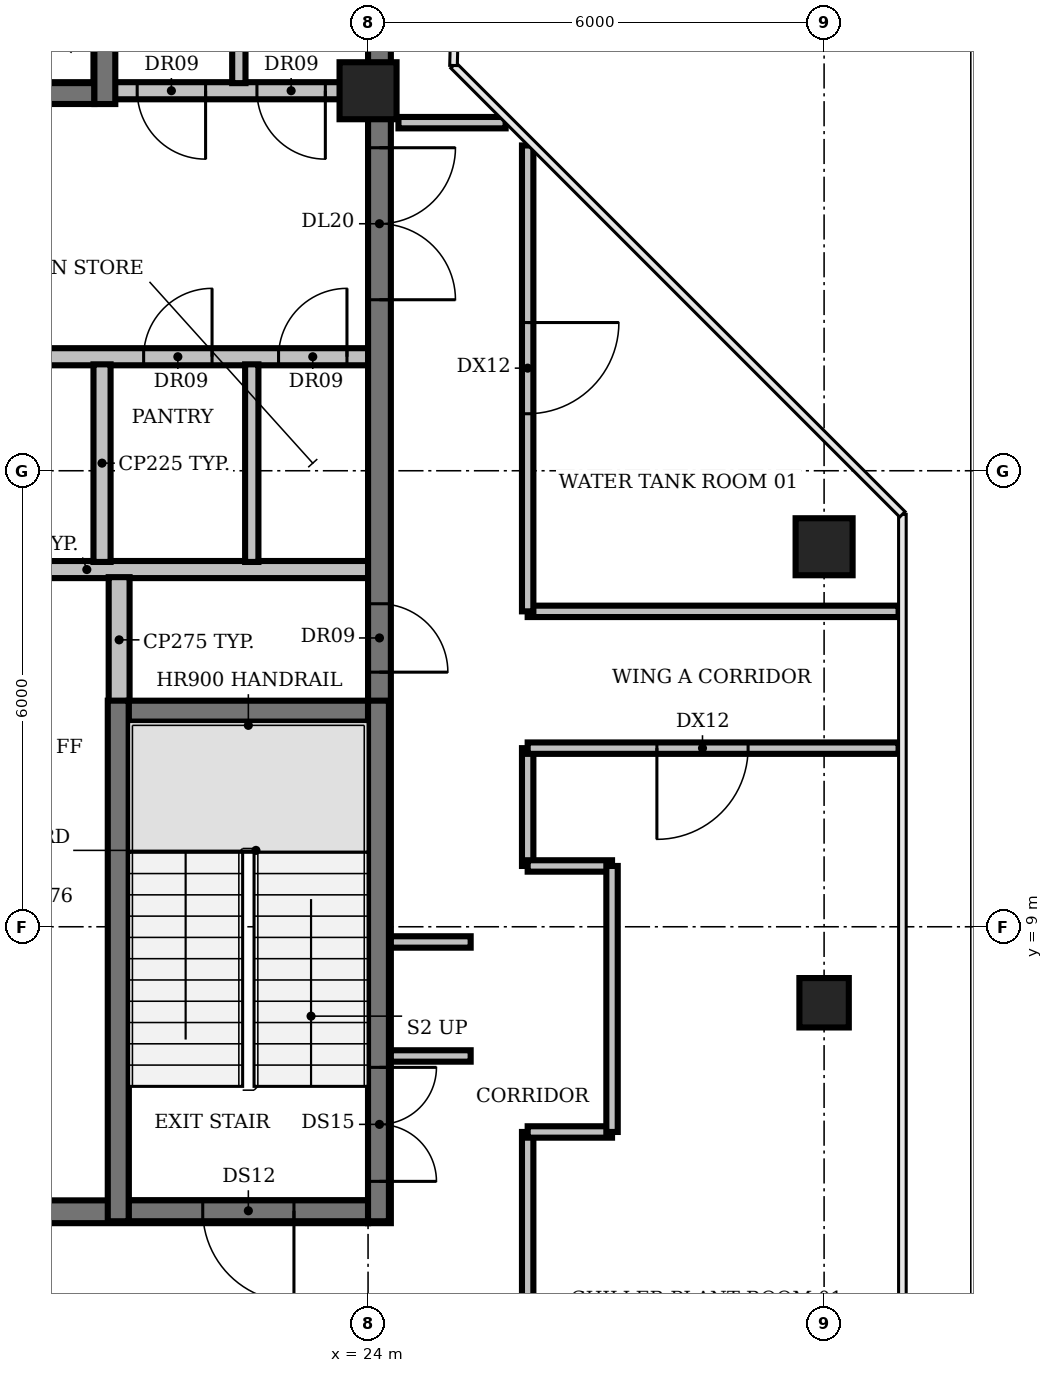
"""IFC4 building model, lengths in metres.
Left out: names, types, materials, properties, quantities, classifications, styles, units other than length and angle.
Written with IfcOpenShell. Run it as: python <this file> out.ifc"""

import sys

from ifc_helpers import new_model, si_unit, direction, frame, frame_2d, origin, origin_2d, place, context, subcontext, project, spatial, rectangle, circle, extrude, element, fill, save


model = new_model("IFC4")
c1 = context("Model", 3, precision=1e-05, world=origin(), true_north=direction((0.0, 1.0)))
c2 = subcontext(c1, "Body", "Model", "MODEL_VIEW")
j1 = project(units=[si_unit("LENGTHUNIT", "METRE"), si_unit("PLANEANGLEUNIT", "RADIAN")], contexts=[c1])
p1 = place(None, origin())
s1 = spatial("IfcSite", under=j1, at=p1, CompositionType="ELEMENT")
p2 = place(p1, origin())
s2 = spatial("IfcBuilding", under=s1, at=p2, CompositionType="ELEMENT")
p3 = place(p2, frame((0.0, 0.0, 339.8)))
s3 = spatial("IfcBuildingStorey", under=s2, at=p3, CompositionType="ELEMENT", Elevation=339.8)
p4 = place(p3, frame((24.0, 20.0, 0.0), z_axis=(0.0, 0.0, 1.0), x_axis=(1.0, 0.0, 0.0)))
e1 = element("IfcColumn", 1, at=p4, inside=s3, PredefinedType="COLUMN", context=c2, shape_type="SweptSolid", body=[
    extrude(circle(Radius=0.375, at=origin_2d()), origin(), (0.0, 0.0, 1.0), 3.9),
])
p5 = place(p3, frame((30.0, 8.0, 0.0), z_axis=(0.0, 0.0, 1.0), x_axis=(1.0, 0.0, 0.0)))
e2 = element("IfcColumn", 2, at=p5, inside=s3, PredefinedType="COLUMN", context=c2, shape_type="SweptSolid", body=[
    extrude(rectangle(XDim=0.65, YDim=0.65, at=origin_2d()), origin(), (0.0, 0.0, 1.0), 3.9),
])
p6 = place(p3, frame((30.0, 14.0, 0.0), z_axis=(0.0, 0.0, 1.0), x_axis=(1.0, 0.0, 0.0)))
e3 = element("IfcColumn", 3, at=p6, inside=s3, PredefinedType="COLUMN", context=c2, shape_type="SweptSolid", body=[
    extrude(circle(Radius=0.375, at=origin_2d()), origin(), (0.0, 0.0, 1.0), 3.9),
])
p7 = place(p3, frame((20.85, 11.825, 0.0), z_axis=(0.0, 0.0, 1.0), x_axis=(1.0, 0.0, 0.0)))
e4 = element("IfcWall", 4, at=p7, inside=s3, PredefinedType="SHEAR", context=c2, shape_type="SweptSolid", body=[
    extrude(rectangle(XDim=3.15, YDim=0.25, at=frame_2d((1.575, 0.0))), origin(), (0.0, 0.0, 1.0), 3.9),
])
p8 = place(p3, frame((16.6, 13.7, 0.0), z_axis=(0.0, 0.0, 1.0), x_axis=(1.0, 0.0, 0.0)))
e5 = element("IfcWall", 5, at=p8, inside=s3, PredefinedType="PARTITIONING", context=c2, shape_type="SweptSolid", body=[
    extrude(rectangle(XDim=7.4, YDim=0.225, at=frame_2d((3.7, 0.0))), origin(), (0.0, 0.0, 1.0), 3.9),
])
p9 = place(p3, frame((9.4, 16.5, 0.0), z_axis=(0.0, 0.0, 1.0), x_axis=(1.0, 0.0, 0.0)))
e6 = element("IfcWall", 6, at=p9, inside=s3, PredefinedType="PARTITIONING", context=c2, shape_type="SweptSolid", body=[
    extrude(rectangle(XDim=14.6, YDim=0.225, at=frame_2d((7.3, 0.0))), origin(), (0.0, 0.0, 1.0), 3.9),
])
p10 = place(p9, frame((0.85, 0.0, 0.0)))
e7 = element("IfcOpeningElement", 7, at=p10, cuts=e6, PredefinedType="OPENING", context=c2, shape_type="SweptSolid", body=[
    extrude(rectangle(XDim=0.9, YDim=2.1, at=frame_2d((0.45, 1.05))), frame((0.0, 0.123, 0.0), z_axis=(0.0, -1.0, 0.0), x_axis=(1.0, 0.0, 0.0)), (0.0, 0.0, 1.0), 0.245),
])
p11 = place(p9, frame((3.625, 0.0, 0.0)))
e8 = element("IfcOpeningElement", 8, at=p11, cuts=e6, PredefinedType="OPENING", context=c2, shape_type="SweptSolid", body=[
    extrude(rectangle(XDim=0.9, YDim=2.1, at=frame_2d((0.45, 1.05))), frame((0.0, 0.123, 0.0), z_axis=(0.0, -1.0, 0.0), x_axis=(1.0, 0.0, 0.0)), (0.0, 0.0, 1.0), 0.245),
])
p12 = place(p9, frame((7.775, 0.0, 0.0)))
e9 = element("IfcOpeningElement", 9, at=p12, cuts=e6, PredefinedType="OPENING", context=c2, shape_type="SweptSolid", body=[
    extrude(rectangle(XDim=1.0, YDim=2.1, at=frame_2d((0.5, 1.05))), frame((0.0, 0.123, 0.0), z_axis=(0.0, -1.0, 0.0), x_axis=(1.0, 0.0, 0.0)), (0.0, 0.0, 1.0), 0.245),
])
p13 = place(p9, frame((11.647, 0.0, 0.0)))
e10 = element("IfcOpeningElement", 10, at=p13, cuts=e6, PredefinedType="OPENING", context=c2, shape_type="SweptSolid", body=[
    extrude(rectangle(XDim=0.9, YDim=2.1, at=frame_2d((0.45, 1.05))), frame((0.0, 0.123, 0.0), z_axis=(0.0, -1.0, 0.0), x_axis=(1.0, 0.0, 0.0)), (0.0, 0.0, 1.0), 0.245),
])
p14 = place(p9, frame((13.423, 0.0, 0.0)))
e11 = element("IfcOpeningElement", 11, at=p14, cuts=e6, PredefinedType="OPENING", context=c2, shape_type="SweptSolid", body=[
    extrude(rectangle(XDim=0.9, YDim=2.1, at=frame_2d((0.45, 1.05))), frame((0.0, 0.123, 0.0), z_axis=(0.0, -1.0, 0.0), x_axis=(1.0, 0.0, 0.0)), (0.0, 0.0, 1.0), 0.245),
])
p15 = place(p3, frame((24.0, 20.0, 0.0), z_axis=(0.0, 0.0, 1.0), x_axis=(-1.0, 0.0, 0.0)))
e12 = element("IfcWall", 12, at=p15, inside=s3, PredefinedType="PARTITIONING", context=c2, shape_type="SweptSolid", body=[
    extrude(rectangle(XDim=14.6, YDim=0.225, at=frame_2d((7.3, 0.0))), origin(), (0.0, 0.0, 1.0), 3.9),
])
p16 = place(p15, frame((12.75, 0.0, 0.0)))
e13 = element("IfcOpeningElement", 13, at=p16, cuts=e12, PredefinedType="OPENING", context=c2, shape_type="SweptSolid", body=[
    extrude(rectangle(XDim=1.1, YDim=2.1, at=frame_2d((0.55, 1.05))), frame((0.0, 0.123, 0.0), z_axis=(0.0, -1.0, 0.0), x_axis=(1.0, 0.0, 0.0)), (0.0, 0.0, 1.0), 0.245),
])
p17 = place(p15, frame((9.95, 0.0, 0.0)))
e14 = element("IfcOpeningElement", 14, at=p17, cuts=e12, PredefinedType="OPENING", context=c2, shape_type="SweptSolid", body=[
    extrude(rectangle(XDim=1.1, YDim=2.1, at=frame_2d((0.55, 1.05))), frame((0.0, 0.123, 0.0), z_axis=(0.0, -1.0, 0.0), x_axis=(1.0, 0.0, 0.0)), (0.0, 0.0, 1.0), 0.245),
])
p18 = place(p15, frame((7.15, 0.0, 0.0)))
e15 = element("IfcOpeningElement", 15, at=p18, cuts=e12, PredefinedType="OPENING", context=c2, shape_type="SweptSolid", body=[
    extrude(rectangle(XDim=1.1, YDim=2.1, at=frame_2d((0.55, 1.05))), frame((0.0, 0.123, 0.0), z_axis=(0.0, -1.0, 0.0), x_axis=(1.0, 0.0, 0.0)), (0.0, 0.0, 1.0), 0.245),
])
p19 = place(p15, frame((4.35, 0.0, 0.0)))
e16 = element("IfcOpeningElement", 16, at=p19, cuts=e12, PredefinedType="OPENING", context=c2, shape_type="SweptSolid", body=[
    extrude(rectangle(XDim=1.1, YDim=2.1, at=frame_2d((0.55, 1.05))), frame((0.0, 0.123, 0.0), z_axis=(0.0, -1.0, 0.0), x_axis=(1.0, 0.0, 0.0)), (0.0, 0.0, 1.0), 0.245),
])
p20 = place(p15, frame((2.137, 0.0, 0.0)))
e17 = element("IfcOpeningElement", 17, at=p20, cuts=e12, PredefinedType="OPENING", context=c2, shape_type="SweptSolid", body=[
    extrude(rectangle(XDim=0.9, YDim=2.1, at=frame_2d((0.45, 1.05))), frame((0.0, 0.123, 0.0), z_axis=(0.0, -1.0, 0.0), x_axis=(1.0, 0.0, 0.0)), (0.0, 0.0, 1.0), 0.245),
])
p21 = place(p15, frame((0.562, 0.0, 0.0)))
e18 = element("IfcOpeningElement", 18, at=p21, cuts=e12, PredefinedType="OPENING", context=c2, shape_type="SweptSolid", body=[
    extrude(rectangle(XDim=0.9, YDim=2.1, at=frame_2d((0.45, 1.05))), frame((0.0, 0.123, 0.0), z_axis=(0.0, -1.0, 0.0), x_axis=(1.0, 0.0, 0.0)), (0.0, 0.0, 1.0), 0.245),
])
for number, where, z_axis, x_axis in (
    (19, (20.5, 13.8, 0.0), (0.0, 0.0, 1.0), (0.0, 1.0, 0.0)),
    (20, (20.5, 20.1, 0.0), (0.0, 0.0, 1.0), (0.0, 1.0, 0.0)),
):
    element("IfcWall", number, at=place(p3, frame(where, z_axis=z_axis, x_axis=x_axis)), inside=s3, PredefinedType="PARTITIONING", context=c2, shape_type="SweptSolid", body=[
        extrude(rectangle(XDim=2.6, YDim=0.225, at=frame_2d((1.3, 0.0))), origin(), (0.0, 0.0, 1.0), 3.9),
    ])
p22 = place(p3, frame((20.725, 5.4, 0.0), z_axis=(0.0, 0.0, 1.0), x_axis=(0.0, 1.0, 0.0)))
e21 = element("IfcWall", 21, at=p22, inside=s3, PredefinedType="SHEAR", context=c2, shape_type="SweptSolid", body=[
    extrude(rectangle(XDim=6.3, YDim=0.25, at=frame_2d((3.15, 0.0))), origin(), (0.0, 0.0, 1.0), 3.9),
])
p23 = place(p3, frame((20.725, 11.95, 0.0), z_axis=(0.0, 0.0, 1.0), x_axis=(0.0, 1.0, 0.0)))
e22 = element("IfcWall", 22, at=p23, inside=s3, PredefinedType="PARTITIONING", context=c2, shape_type="SweptSolid", body=[
    extrude(rectangle(XDim=1.65, YDim=0.275, at=frame_2d((0.825, 0.0))), origin(), (0.0, 0.0, 1.0), 3.9),
])
for number, where, z_axis, x_axis in (
    (23, (22.3, 20.1, 0.0), (0.0, 0.0, 1.0), (0.0, 1.0, 0.0)),
    (24, (22.47, 13.8, 0.0), (0.0, 0.0, 1.0), (0.0, 1.0, 0.0)),
):
    element("IfcWall", number, at=place(p3, frame(where, z_axis=z_axis, x_axis=x_axis)), inside=s3, PredefinedType="PARTITIONING", context=c2, shape_type="SweptSolid", body=[
        extrude(rectangle(XDim=2.6, YDim=0.175, at=frame_2d((1.3, 0.0))), origin(), (0.0, 0.0, 1.0), 3.9),
    ])
p24 = place(p3, frame((24.15, 25.705, 0.0), z_axis=(0.0, 0.0, 1.0), x_axis=(0.0, -1.0, 0.0)))
e25 = element("IfcWall", 25, at=p24, inside=s3, PredefinedType="SHEAR", context=c2, shape_type="SweptSolid", body=[
    extrude(rectangle(XDim=20.605, YDim=0.3, at=frame_2d((10.302, 0.0))), origin(), (0.0, 0.0, 1.0), 3.9),
])
p25 = place(p24, frame((18.555, 0.0, 0.0)))
e26 = element("IfcOpeningElement", 26, at=p25, cuts=e25, PredefinedType="OPENING", context=c2, shape_type="SweptSolid", body=[
    extrude(rectangle(XDim=1.5, YDim=2.1, at=frame_2d((0.75, 1.05))), frame((0.0, 0.16, 0.0), z_axis=(0.0, -1.0, 0.0), x_axis=(1.0, 0.0, 0.0)), (0.0, 0.0, 1.0), 0.32),
])
p26 = place(p24, frame((12.455, 0.0, 0.0)))
e27 = element("IfcOpeningElement", 27, at=p26, cuts=e25, PredefinedType="OPENING", context=c2, shape_type="SweptSolid", body=[
    extrude(rectangle(XDim=0.9, YDim=2.1, at=frame_2d((0.45, 1.05))), frame((0.0, 0.16, 0.0), z_axis=(0.0, -1.0, 0.0), x_axis=(1.0, 0.0, 0.0)), (0.0, 0.0, 1.0), 0.32),
])
p27 = place(p24, frame((6.455, 0.0, 0.0)))
e28 = element("IfcOpeningElement", 28, at=p27, cuts=e25, PredefinedType="OPENING", context=c2, shape_type="SweptSolid", body=[
    extrude(rectangle(XDim=2.0, YDim=2.1, at=frame_2d((1.0, 1.05))), frame((0.0, 0.16, 0.0), z_axis=(0.0, -1.0, 0.0), x_axis=(1.0, 0.0, 0.0)), (0.0, 0.0, 1.0), 0.32),
])
p28 = place(p3, frame((24.0, 5.25, 0.0), z_axis=(0.0, 0.0, 1.0), x_axis=(-1.0, 0.0, 0.0)))
e29 = element("IfcWall", 29, at=p28, inside=s3, PredefinedType="SHEAR", context=c2, shape_type="SweptSolid", body=[
    extrude(rectangle(XDim=18.0, YDim=0.3, at=frame_2d((9.0, 0.0))), origin(), (0.0, 0.0, 1.0), 3.9),
])
p29 = place(p28, frame((13.0, 0.0, 0.0)))
e30 = element("IfcOpeningElement", 30, at=p29, cuts=e29, PredefinedType="OPENING", context=c2, shape_type="SweptSolid", body=[
    extrude(rectangle(XDim=1.2, YDim=2.1, at=frame_2d((0.6, 1.05))), frame((0.0, 0.16, 0.0), z_axis=(0.0, -1.0, 0.0), x_axis=(1.0, 0.0, 0.0)), (0.0, 0.0, 1.0), 0.32),
])
p30 = place(p28, frame((4.9, 0.0, 0.0)))
e31 = element("IfcOpeningElement", 31, at=p30, cuts=e29, PredefinedType="OPENING", context=c2, shape_type="SweptSolid", body=[
    extrude(rectangle(XDim=1.0, YDim=2.1, at=frame_2d((0.5, 1.05))), frame((0.0, 0.16, 0.0), z_axis=(0.0, -1.0, 0.0), x_axis=(1.0, 0.0, 0.0)), (0.0, 0.0, 1.0), 0.32),
])
p31 = place(p3, frame((24.0, 5.263, 4.2), z_axis=(0.0, 0.0, 1.0), x_axis=(-1.0, 0.0, 0.0)))
e32 = element("IfcWall", 32, at=p31, inside=s3, PredefinedType="SHEAR", context=c2, shape_type="SweptSolid", body=[
    extrude(rectangle(XDim=3.15, YDim=0.275, at=frame_2d((1.575, 0.0))), origin(), (0.0, 0.0, 1.0), 3.0),
])
p32 = place(p31, frame((0.975, 0.0, 0.0)))
e33 = element("IfcOpeningElement", 33, at=p32, cuts=e32, PredefinedType="OPENING", context=c2, shape_type="SweptSolid", body=[
    extrude(rectangle(XDim=1.2, YDim=2.1, at=frame_2d((0.6, 1.05))), frame((0.0, 0.147, 0.0), z_axis=(0.0, -1.0, 0.0), x_axis=(1.0, 0.0, 0.0)), (0.0, 0.0, 1.0), 0.295),
])
p33 = place(p3, frame((20.85, 11.837, 4.2), z_axis=(0.0, 0.0, 1.0), x_axis=(1.0, 0.0, 0.0)))
e34 = element("IfcWall", 34, at=p33, inside=s3, PredefinedType="SHEAR", context=c2, shape_type="SweptSolid", body=[
    extrude(rectangle(XDim=3.15, YDim=0.275, at=frame_2d((1.575, 0.0))), origin(), (0.0, 0.0, 1.0), 3.0),
])
p34 = place(p3, frame((20.4, 19.963, 4.2), z_axis=(0.0, 0.0, 1.0), x_axis=(-1.0, 0.0, 0.0)))
e35 = element("IfcWall", 35, at=p34, inside=s3, PredefinedType="SHEAR", context=c2, shape_type="SweptSolid", body=[
    extrude(rectangle(XDim=11.0, YDim=0.275, at=frame_2d((5.5, 0.0))), origin(), (0.0, 0.0, 1.0), 3.0),
])
p35 = place(p34, frame((5.0, 0.0, 0.0)))
e36 = element("IfcOpeningElement", 36, at=p35, cuts=e35, PredefinedType="OPENING", context=c2, shape_type="SweptSolid", body=[
    extrude(rectangle(XDim=1.0, YDim=2.1, at=frame_2d((0.5, 1.05))), frame((0.0, 0.147, 0.0), z_axis=(0.0, -1.0, 0.0), x_axis=(1.0, 0.0, 0.0)), (0.0, 0.0, 1.0), 0.295),
])
p36 = place(p3, frame((20.537, 19.825, 4.2), z_axis=(0.0, 0.0, 1.0), x_axis=(0.0, 1.0, 0.0)))
e37 = element("IfcWall", 37, at=p36, inside=s3, PredefinedType="SHEAR", context=c2, shape_type="SweptSolid", body=[
    extrude(rectangle(XDim=3.15, YDim=0.275, at=frame_2d((1.575, 0.0))), origin(), (0.0, 0.0, 1.0), 3.0),
])
for number, where, z_axis, x_axis in (
    (38, (20.713, 5.125, 4.2), (0.0, 0.0, 1.0), (0.0, 1.0, 0.0)),
    (39, (24.137, 5.125, 4.2), (0.0, 0.0, 1.0), (0.0, 1.0, 0.0)),
):
    element("IfcWall", number, at=place(p3, frame(where, z_axis=z_axis, x_axis=x_axis)), inside=s3, PredefinedType="SHEAR", context=c2, shape_type="SweptSolid", body=[
        extrude(rectangle(XDim=6.85, YDim=0.275, at=frame_2d((3.425, 0.0))), origin(), (0.0, 0.0, 1.0), 3.0),
    ])
for number, where, z_axis, x_axis in (
    (40, (24.3, 7.3, 0.0), (0.0, 0.0, 1.0), (1.0, 0.0, 0.0)),
    (41, (24.3, 8.8, 0.0), (0.0, 0.0, 1.0), (1.0, 0.0, 0.0)),
):
    element("IfcWall", number, at=place(p3, frame(where, z_axis=z_axis, x_axis=x_axis)), inside=s3, PredefinedType="PARTITIONING", context=c2, shape_type="SweptSolid", body=[
        extrude(rectangle(XDim=1.05, YDim=0.15, at=frame_2d((0.525, 0.0))), origin(), (0.0, 0.0, 1.0), 2.95),
    ])
p37 = place(p3, frame((24.4, 19.58, 0.0), z_axis=(0.0, 0.0, 1.0), x_axis=(1.0, 0.0, 0.0)))
e42 = element("IfcWall", 42, at=p37, inside=s3, PredefinedType="PARTITIONING", context=c2, shape_type="SweptSolid", body=[
    extrude(rectangle(XDim=1.41, YDim=0.15, at=frame_2d((0.705, 0.0))), origin(), (0.0, 0.0, 1.0), 2.95),
])
p38 = place(p3, frame((26.1, -3.29, 0.0), z_axis=(0.0, 0.0, 1.0), x_axis=(0.0, 1.0, 0.0)))
e43 = element("IfcWall", 43, at=p38, inside=s3, PredefinedType="PARTITIONING", context=c2, shape_type="SweptSolid", body=[
    extrude(rectangle(XDim=9.59, YDim=0.15, at=frame_2d((4.795, 0.0))), origin(), (0.0, 0.0, 1.0), 2.95),
])
p39 = place(p3, frame((26.1, 6.3, 0.0), z_axis=(0.0, 0.0, 1.0), x_axis=(1.0, 0.0, 0.0)))
e44 = element("IfcWall", 44, at=p39, inside=s3, PredefinedType="PARTITIONING", context=c2, shape_type="SweptSolid", body=[
    extrude(rectangle(XDim=1.11, YDim=0.15, at=frame_2d((0.555, 0.0))), origin(), (0.0, 0.0, 1.0), 2.95),
])
p40 = place(p3, frame((26.1, 9.8, 0.0), z_axis=(0.0, 0.0, 1.0), x_axis=(0.0, 1.0, 0.0)))
e45 = element("IfcWall", 45, at=p40, inside=s3, PredefinedType="PARTITIONING", context=c2, shape_type="SweptSolid", body=[
    extrude(rectangle(XDim=1.55, YDim=0.15, at=frame_2d((0.775, 0.0))), origin(), (0.0, 0.0, 1.0), 2.95),
])
p41 = place(p3, frame((26.1, 9.8, 0.0), z_axis=(0.0, 0.0, 1.0), x_axis=(1.0, 0.0, 0.0)))
e46 = element("IfcWall", 46, at=p41, inside=s3, PredefinedType="PARTITIONING", context=c2, shape_type="SweptSolid", body=[
    extrude(rectangle(XDim=1.11, YDim=0.15, at=frame_2d((0.555, 0.0))), origin(), (0.0, 0.0, 1.0), 2.95),
])
p42 = place(p3, frame((26.1, 13.15, 0.0), z_axis=(0.0, 0.0, 1.0), x_axis=(1.0, 0.0, 0.0)))
e47 = element("IfcWall", 47, at=p42, inside=s3, PredefinedType="PARTITIONING", context=c2, shape_type="SweptSolid", body=[
    extrude(rectangle(XDim=4.88, YDim=0.15, at=frame_2d((2.44, 0.0))), origin(), (0.0, 0.0, 1.0), 2.95),
])
p43 = place(p3, frame((26.1, 19.28, 0.0), z_axis=(0.0, 0.0, 1.0), x_axis=(0.0, -1.0, 0.0)))
e48 = element("IfcWall", 48, at=p43, inside=s3, PredefinedType="PARTITIONING", context=c2, shape_type="SweptSolid", body=[
    extrude(rectangle(XDim=6.13, YDim=0.15, at=frame_2d((3.065, 0.0))), origin(), (0.0, 0.0, 1.0), 2.95),
])
p44 = place(p43, frame((2.33, 0.0, 0.0)))
e49 = element("IfcOpeningElement", 49, at=p44, cuts=e48, PredefinedType="OPENING", context=c2, shape_type="SweptSolid", body=[
    extrude(rectangle(XDim=1.2, YDim=2.1, at=frame_2d((0.6, 1.05))), frame((0.0, 0.085, 0.0), z_axis=(0.0, -1.0, 0.0), x_axis=(1.0, 0.0, 0.0)), (0.0, 0.0, 1.0), 0.17),
])
p45 = place(p3, frame((27.21, 6.3, 0.0), z_axis=(0.0, 0.0, 1.0), x_axis=(0.0, 1.0, 0.0)))
e50 = element("IfcWall", 50, at=p45, inside=s3, PredefinedType="PARTITIONING", context=c2, shape_type="SweptSolid", body=[
    extrude(rectangle(XDim=3.5, YDim=0.15, at=frame_2d((1.75, 0.0))), origin(), (0.0, 0.0, 1.0), 2.95),
])
p46 = place(p3, frame((30.98, 11.35, 0.0), z_axis=(0.0, 0.0, 1.0), x_axis=(-1.0, 0.0, 0.0)))
e51 = element("IfcWall", 51, at=p46, inside=s3, PredefinedType="PARTITIONING", context=c2, shape_type="SweptSolid", body=[
    extrude(rectangle(XDim=4.88, YDim=0.15, at=frame_2d((2.44, 0.0))), origin(), (0.0, 0.0, 1.0), 2.95),
])
p47 = place(p46, frame((1.98, 0.0, 0.0)))
e52 = element("IfcOpeningElement", 52, at=p47, cuts=e51, PredefinedType="OPENING", context=c2, shape_type="SweptSolid", body=[
    extrude(rectangle(XDim=1.2, YDim=2.1, at=frame_2d((0.6, 1.05))), frame((0.0, 0.085, 0.0), z_axis=(0.0, -1.0, 0.0), x_axis=(1.0, 0.0, 0.0)), (0.0, 0.0, 1.0), 0.17),
])
p48 = place(p13, origin())
e53 = element("IfcDoor", 53, at=p48, inside=s3, OperationType="SINGLE_SWING_RIGHT", PredefinedType="DOOR", context=c2, shape_type="SweptSolid", body=[
    extrude(rectangle(XDim=0.9, YDim=2.1, at=frame_2d((0.45, 1.05))), frame((0.0, 0.025, 0.0), z_axis=(0.0, -1.0, 0.0), x_axis=(1.0, 0.0, 0.0)), (0.0, 0.0, 1.0), 0.05),
])
fill(e10, e53)
p49 = place(p14, origin())
e54 = element("IfcDoor", 54, at=p49, inside=s3, OperationType="SINGLE_SWING_RIGHT", PredefinedType="DOOR", context=c2, shape_type="SweptSolid", body=[
    extrude(rectangle(XDim=0.9, YDim=2.1, at=frame_2d((0.45, 1.05))), frame((0.0, 0.025, 0.0), z_axis=(0.0, -1.0, 0.0), x_axis=(1.0, 0.0, 0.0)), (0.0, 0.0, 1.0), 0.05),
])
fill(e11, e54)
p50 = place(p20, origin())
e55 = element("IfcDoor", 55, at=p50, inside=s3, OperationType="SINGLE_SWING_LEFT", PredefinedType="DOOR", context=c2, shape_type="SweptSolid", body=[
    extrude(rectangle(XDim=0.9, YDim=2.1, at=frame_2d((0.45, 1.05))), frame((0.0, 0.025, 0.0), z_axis=(0.0, -1.0, 0.0), x_axis=(1.0, 0.0, 0.0)), (0.0, 0.0, 1.0), 0.05),
])
fill(e17, e55)
p51 = place(p21, origin())
e56 = element("IfcDoor", 56, at=p51, inside=s3, OperationType="SINGLE_SWING_LEFT", PredefinedType="DOOR", context=c2, shape_type="SweptSolid", body=[
    extrude(rectangle(XDim=0.9, YDim=2.1, at=frame_2d((0.45, 1.05))), frame((0.0, 0.025, 0.0), z_axis=(0.0, -1.0, 0.0), x_axis=(1.0, 0.0, 0.0)), (0.0, 0.0, 1.0), 0.05),
])
fill(e18, e56)
p52 = place(p25, origin())
e57 = element("IfcDoor", 57, at=p52, inside=s3, OperationType="DOUBLE_DOOR_SINGLE_SWING", PredefinedType="DOOR", context=c2, shape_type="SweptSolid", body=[
    extrude(rectangle(XDim=1.5, YDim=2.1, at=frame_2d((0.75, 1.05))), frame((0.0, 0.025, 0.0), z_axis=(0.0, -1.0, 0.0), x_axis=(1.0, 0.0, 0.0)), (0.0, 0.0, 1.0), 0.05),
])
fill(e26, e57)
p53 = place(p26, origin())
e58 = element("IfcDoor", 58, at=p53, inside=s3, OperationType="SINGLE_SWING_RIGHT", PredefinedType="DOOR", context=c2, shape_type="SweptSolid", body=[
    extrude(rectangle(XDim=0.9, YDim=2.1, at=frame_2d((0.45, 1.05))), frame((0.0, 0.025, 0.0), z_axis=(0.0, -1.0, 0.0), x_axis=(1.0, 0.0, 0.0)), (0.0, 0.0, 1.0), 0.05),
])
fill(e27, e58)
p54 = place(p27, origin())
e59 = element("IfcDoor", 59, at=p54, inside=s3, OperationType="DOUBLE_DOOR_SINGLE_SWING", PredefinedType="DOOR", context=c2, shape_type="SweptSolid", body=[
    extrude(rectangle(XDim=2.0, YDim=2.1, at=frame_2d((1.0, 1.05))), frame((0.0, 0.025, 0.0), z_axis=(0.0, -1.0, 0.0), x_axis=(1.0, 0.0, 0.0)), (0.0, 0.0, 1.0), 0.05),
])
fill(e28, e59)
p55 = place(p32, origin())
e60 = element("IfcDoor", 60, at=p55, inside=s3, OperationType="SINGLE_SWING_LEFT", PredefinedType="DOOR", context=c2, shape_type="SweptSolid", body=[
    extrude(rectangle(XDim=1.2, YDim=2.1, at=frame_2d((0.6, 1.05))), frame((0.0, 0.025, 0.0), z_axis=(0.0, -1.0, 0.0), x_axis=(1.0, 0.0, 0.0)), (0.0, 0.0, 1.0), 0.05),
])
fill(e33, e60)
p56 = place(p44, origin())
e61 = element("IfcDoor", 61, at=p56, inside=s3, OperationType="SINGLE_SWING_LEFT", PredefinedType="DOOR", context=c2, shape_type="SweptSolid", body=[
    extrude(rectangle(XDim=1.2, YDim=2.1, at=frame_2d((0.6, 1.05))), frame((0.0, 0.025, 0.0), z_axis=(0.0, -1.0, 0.0), x_axis=(1.0, 0.0, 0.0)), (0.0, 0.0, 1.0), 0.05),
])
fill(e49, e61)
p57 = place(p47, origin())
e62 = element("IfcDoor", 62, at=p57, inside=s3, OperationType="SINGLE_SWING_RIGHT", PredefinedType="DOOR", context=c2, shape_type="SweptSolid", body=[
    extrude(rectangle(XDim=1.2, YDim=2.1, at=frame_2d((0.6, 1.05))), frame((0.0, 0.025, 0.0), z_axis=(0.0, -1.0, 0.0), x_axis=(1.0, 0.0, 0.0)), (0.0, 0.0, 1.0), 0.05),
])
fill(e52, e62)
save(model, sys.argv[1])
